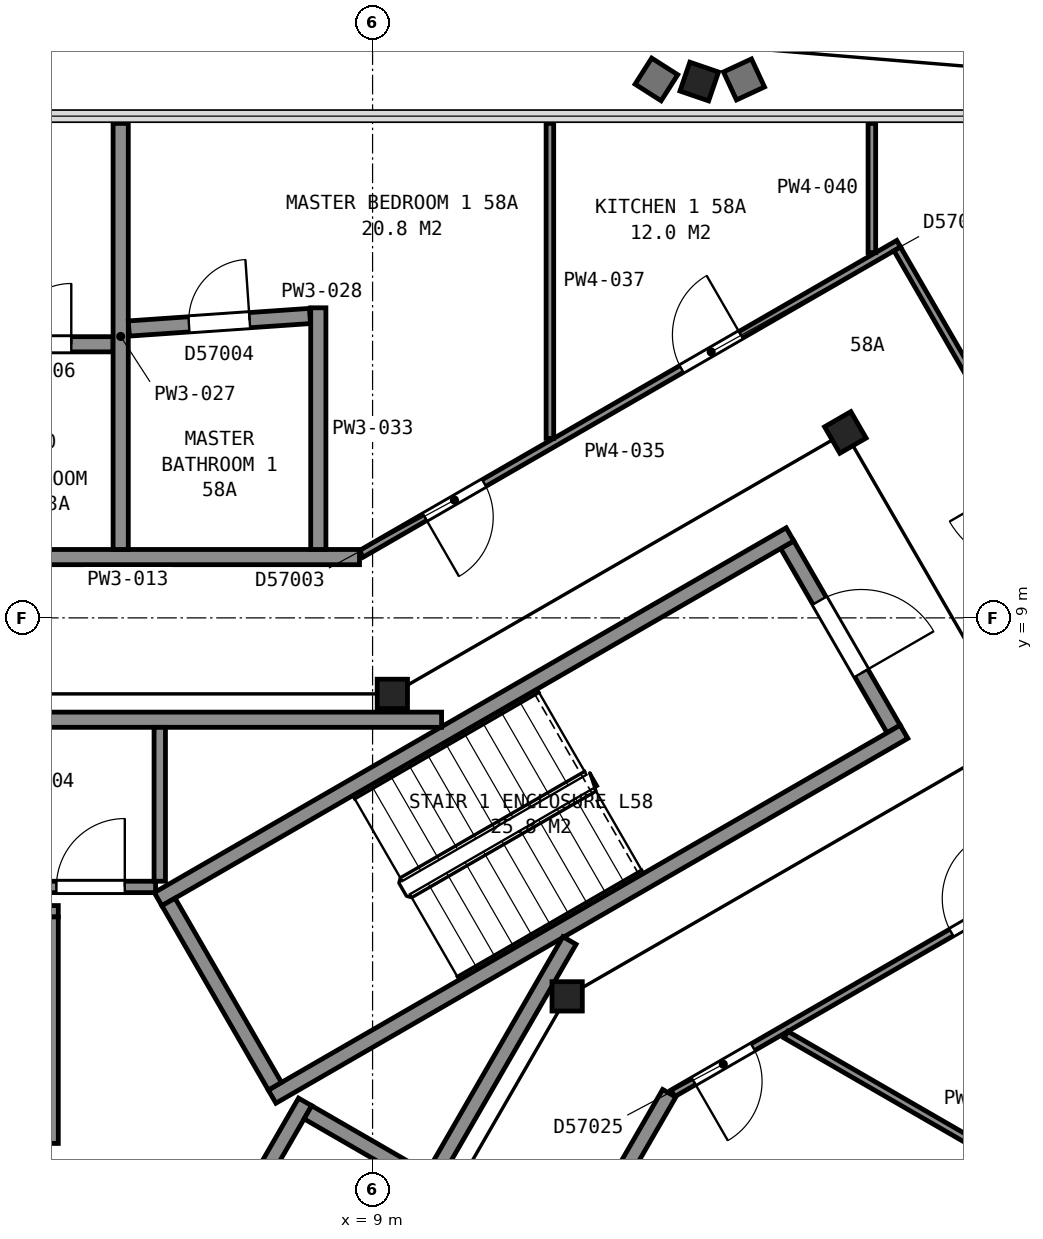
"""IFC4 building model, lengths in metres.
Left out: names, types, materials, properties, quantities, classifications, styles, units other than length and angle.
Written with IfcOpenShell. Run it as: python <this file> out.ifc"""

import sys

from ifc_helpers import new_model, si_unit, direction, frame, frame_2d, origin, origin_2d, place, context, subcontext, project, spatial, rectangle, i_section, extrude, element, fill, save


model = new_model("IFC4")
c1 = context("Model", 3, precision=1e-05, world=origin(), true_north=direction((0.0, 1.0)))
c2 = subcontext(c1, "Body", "Model", "MODEL_VIEW")
j1 = project(units=[si_unit("LENGTHUNIT", "METRE"), si_unit("PLANEANGLEUNIT", "RADIAN")], contexts=[c1])
p1 = place(None, origin())
s1 = spatial("IfcSite", under=j1, at=p1, CompositionType="ELEMENT")
p2 = place(p1, origin())
s2 = spatial("IfcBuilding", under=s1, at=p2, CompositionType="ELEMENT")
p3 = place(p2, frame((0.0, 0.0, 232.3)))
s3 = spatial("IfcBuildingStorey", under=s2, at=p3, CompositionType="ELEMENT", Elevation=232.3)
p4 = place(p3, frame((13.222, 15.837, 0.035), z_axis=(0.063574032022, 0.185512190953, 0.980583280227), x_axis=(0.997903164176, 0.000145439702, -0.064724444963)))
e1 = element("IfcColumn", 1, at=p4, inside=s3, PredefinedType="COLUMN", context=c2, shape_type="SweptSolid", body=[
    extrude(i_section(OverallWidth=0.401, OverallDepth=0.399, WebThickness=0.025, FlangeThickness=0.04, FilletRadius=0.015, at=origin_2d()), origin(), (0.0, 0.0, 1.0), 3.702),
])
p5 = place(p3, frame((11.56, 4.02, 0.0), z_axis=(0.0, 0.0, 1.0), x_axis=(1.0, 0.0, 0.0)))
e2 = element("IfcColumn", 2, at=p5, inside=s3, PredefinedType="COLUMN", context=c2, shape_type="SweptSolid", body=[
    extrude(i_section(OverallWidth=0.399, OverallDepth=0.386, WebThickness=0.021, FlangeThickness=0.033, FilletRadius=0.015, at=origin_2d()), origin(), (0.0, 0.0, 1.0), 3.7),
])
p6 = place(p3, frame((15.22, 11.44, 0.0), z_axis=(0.0, 0.0, 1.0), x_axis=(0.5, -0.866025403784, 0.0)))
e3 = element("IfcColumn", 3, at=p6, inside=s3, PredefinedType="COLUMN", context=c2, shape_type="SweptSolid", body=[
    extrude(i_section(OverallWidth=0.401, OverallDepth=0.399, WebThickness=0.025, FlangeThickness=0.04, FilletRadius=0.015, at=origin_2d()), origin(), (0.0, 0.0, 1.0), 3.7),
])
p7 = place(p3, frame((9.26, 8.0, 0.0), z_axis=(0.0, 0.0, 1.0), x_axis=(1.0, 0.0, 0.0)))
e4 = element("IfcColumn", 4, at=p7, inside=s3, PredefinedType="COLUMN", context=c2, shape_type="SweptSolid", body=[
    extrude(i_section(OverallWidth=0.399, OverallDepth=0.386, WebThickness=0.021, FlangeThickness=0.033, FilletRadius=0.015, at=origin_2d()), origin(), (0.0, 0.0, 1.0), 3.7),
])
p8 = place(p3, frame((15.855, 7.538, 0.0), z_axis=(0.0, 0.0, 1.0), x_axis=(-0.500049511043, 0.865996816683, 0.0)))
e5 = element("IfcWall", 5, at=p8, inside=s3, PredefinedType="PARTITIONING", context=c2, shape_type="SweptSolid", body=[
    extrude(rectangle(XDim=2.8, YDim=0.2, at=frame_2d((1.4, 0.0))), origin(), (0.0, 0.0, 1.0), 3.45),
])
p9 = place(p8, frame((0.85, 0.0, 0.0)))
e6 = element("IfcOpeningElement", 6, at=p9, cuts=e5, PredefinedType="OPENING", context=c2, shape_type="SweptSolid", body=[
    extrude(rectangle(XDim=1.1, YDim=2.1, at=frame_2d((0.55, 1.05))), frame((0.0, 0.11, 0.0), z_axis=(0.0, -1.0, 0.0), x_axis=(1.0, 0.0, 0.0)), (0.0, 0.0, 1.0), 0.22),
])
for number, where, z_axis, x_axis in (
    (7, (6.178, 5.299, 0.0), (0.0, 0.0, 1.0), (0.866, 0.5, 0.0)),
    (8, (7.678, 2.701, 0.0), (0.0, 0.0, 1.0), (0.866, 0.5, 0.0)),
):
    element("IfcWall", number, at=place(p3, frame(where, z_axis=z_axis, x_axis=x_axis)), inside=s3, PredefinedType="PARTITIONING", context=c2, shape_type="SweptSolid", body=[
        extrude(rectangle(XDim=9.6, YDim=0.2, at=frame_2d((4.8, 0.0))), origin(), (0.0, 0.0, 1.0), 3.45),
    ])
p10 = place(p3, frame((7.715, 2.838, 0.0), z_axis=(0.0, 0.0, 1.0), x_axis=(-0.500049511043, 0.865996816683, 0.0)))
e9 = element("IfcWall", 9, at=p10, inside=s3, PredefinedType="PARTITIONING", context=c2, shape_type="SweptSolid", body=[
    extrude(rectangle(XDim=2.8, YDim=0.2, at=frame_2d((1.4, 0.0))), origin(), (0.0, 0.0, 1.0), 3.45),
])
p11 = place(p3, frame((5.663, -1.612, 0.0), z_axis=(0.0, 0.0, 1.0), x_axis=(0.49998122708, 0.866036242063, 0.0)))
e10 = element("IfcWall", 10, at=p11, inside=s3, PredefinedType="PARTITIONING", context=c2, shape_type="SweptSolid", body=[
    extrude(rectangle(XDim=4.9, YDim=0.2, at=frame_2d((2.45, 0.0))), origin(), (0.0, 0.0, 1.0), 3.7),
])
p12 = place(p3, frame((9.665, 1.62, 0.0), z_axis=(0.0, 0.0, 1.0), x_axis=(-0.866002029911, 0.500040482552, 0.0)))
e11 = element("IfcWall", 11, at=p12, inside=s3, PredefinedType="PARTITIONING", context=c2, shape_type="SweptSolid", body=[
    extrude(rectangle(XDim=1.75, YDim=0.2, at=frame_2d((0.875, 0.0))), origin(), (0.0, 0.0, 1.0), 3.7),
])
p13 = place(p3, frame((-3.933, 7.66, 0.0), z_axis=(0.0, 0.0, 1.0), x_axis=(1.0, 0.0, 0.0)))
e12 = element("IfcWall", 12, at=p13, inside=s3, PredefinedType="PARTITIONING", context=c2, shape_type="SweptSolid", body=[
    extrude(rectangle(XDim=13.841, YDim=0.2, at=frame_2d((6.92, 0.0))), origin(), (0.0, 0.0, 1.0), 3.45),
])
p14 = place(p3, frame((-0.245, 5.14, 0.0), z_axis=(0.0, 0.0, 1.0), x_axis=(1.0, 0.0, 0.0)))
e13 = element("IfcWall", 13, at=p14, inside=s3, PredefinedType="PARTITIONING", context=c2, shape_type="SweptSolid", body=[
    extrude(rectangle(XDim=5.11, YDim=0.15, at=frame_2d((2.555, 0.0))), origin(), (0.0, 0.0, 1.0), 3.45),
])
p15 = place(p14, frame((0.175, 0.0, 0.0)))
e14 = element("IfcOpeningElement", 14, at=p15, cuts=e13, PredefinedType="OPENING", context=c2, shape_type="SweptSolid", body=[
    extrude(rectangle(XDim=1.0, YDim=2.1, at=frame_2d((0.5, 1.05))), frame((0.0, 0.085, 0.0), z_axis=(0.0, -1.0, 0.0), x_axis=(1.0, 0.0, 0.0)), (0.0, 0.0, 1.0), 0.17),
])
p16 = place(p3, frame((0.925, 5.46, 0.0), z_axis=(0.0, 0.0, 1.0), x_axis=(1.0, 0.0, 0.0)))
e15 = element("IfcWall", 15, at=p16, inside=s3, PredefinedType="PARTITIONING", context=c2, shape_type="SweptSolid", body=[
    extrude(rectangle(XDim=5.22, YDim=0.15, at=frame_2d((2.61, 0.0))), origin(), (0.0, 0.0, 1.0), 3.45),
])
p17 = place(p16, frame((3.915, 0.0, 0.0)))
e16 = element("IfcOpeningElement", 16, at=p17, cuts=e15, PredefinedType="OPENING", context=c2, shape_type="SweptSolid", body=[
    extrude(rectangle(XDim=0.9, YDim=2.1, at=frame_2d((0.45, 1.05))), frame((0.0, 0.085, 0.0), z_axis=(0.0, -1.0, 0.0), x_axis=(1.0, 0.0, 0.0)), (0.0, 0.0, 1.0), 0.17),
])
p18 = place(p3, frame((4.79, 2.085, 0.0), z_axis=(0.0, 0.0, 1.0), x_axis=(0.0, 1.0, 0.0)))
e17 = element("IfcWall", 17, at=p18, inside=s3, PredefinedType="PARTITIONING", context=c2, shape_type="SweptSolid", body=[
    extrude(rectangle(XDim=2.98, YDim=0.15, at=frame_2d((1.49, 0.0))), origin(), (0.0, 0.0, 1.0), 3.45),
])
p19 = place(p3, frame((6.2, 5.535, 0.0), z_axis=(0.0, 0.0, 1.0), x_axis=(0.0, 1.0, 0.0)))
e18 = element("IfcWall", 18, at=p19, inside=s3, PredefinedType="PARTITIONING", context=c2, shape_type="SweptSolid", body=[
    extrude(rectangle(XDim=2.025, YDim=0.15, at=frame_2d((1.013, 0.0))), origin(), (0.0, 0.0, 1.0), 3.45),
])
p20 = place(p3, frame((9.803, 1.658, 0.0), z_axis=(0.0, 0.0, 1.0), x_axis=(0.499943114462, 0.866058244174, 0.0)))
e19 = element("IfcWall", 19, at=p20, inside=s3, PredefinedType="PARTITIONING", context=c2, shape_type="SweptSolid", body=[
    extrude(rectangle(XDim=3.576, YDim=0.2, at=frame_2d((1.788, 0.0))), origin(), (0.0, 0.0, 1.0), 3.45),
])
p21 = place(p3, frame((-8.828, 9.8, 0.0), z_axis=(0.0, 0.0, 1.0), x_axis=(1.0, 0.0, 0.0)))
e20 = element("IfcWall", 20, at=p21, inside=s3, PredefinedType="PARTITIONING", context=c2, shape_type="SweptSolid", body=[
    extrude(rectangle(XDim=17.656, YDim=0.2, at=frame_2d((8.828, 0.0))), origin(), (0.0, 0.0, 1.0), 2.713),
])
p22 = place(p21, frame((10.658, 0.0, 0.0)))
e21 = element("IfcOpeningElement", 21, at=p22, cuts=e20, PredefinedType="OPENING", context=c2, shape_type="SweptSolid", body=[
    extrude(rectangle(XDim=0.9, YDim=2.1, at=frame_2d((0.45, 1.05))), frame((0.0, 0.11, 0.0), z_axis=(0.0, -1.0, 0.0), x_axis=(1.0, 0.0, 0.0)), (0.0, 0.0, 1.0), 0.22),
])
p23 = place(p21, frame((6.825, 0.0, 0.0)))
e22 = element("IfcOpeningElement", 22, at=p23, cuts=e20, PredefinedType="OPENING", context=c2, shape_type="SweptSolid", body=[
    extrude(rectangle(XDim=0.9, YDim=2.1, at=frame_2d((0.45, 1.05))), frame((0.0, 0.11, 0.0), z_axis=(0.0, -1.0, 0.0), x_axis=(1.0, 0.0, 0.0)), (0.0, 0.0, 1.0), 0.22),
])
p24 = place(p21, frame((1.95, 0.0, 0.0)))
e23 = element("IfcOpeningElement", 23, at=p24, cuts=e20, PredefinedType="OPENING", context=c2, shape_type="SweptSolid", body=[
    extrude(rectangle(XDim=0.9, YDim=2.1, at=frame_2d((0.45, 1.05))), frame((0.0, 0.11, 0.0), z_axis=(0.0, -1.0, 0.0), x_axis=(1.0, 0.0, 0.0)), (0.0, 0.0, 1.0), 0.22),
])
p25 = place(p3, frame((5.586, 12.6, 0.0), z_axis=(0.0, 0.0, 1.0), x_axis=(-1.0, 0.0, 0.0)))
e24 = element("IfcWall", 24, at=p25, inside=s3, PredefinedType="PARTITIONING", context=c2, shape_type="SweptSolid", body=[
    extrude(rectangle(XDim=1.9, YDim=0.2, at=frame_2d((0.95, 0.0))), origin(), (0.0, 0.0, 1.0), 2.713),
])
p26 = place(p25, frame((0.55, 0.0, 0.0)))
e25 = element("IfcOpeningElement", 25, at=p26, cuts=e24, PredefinedType="OPENING", context=c2, shape_type="SweptSolid", body=[
    extrude(rectangle(XDim=0.8, YDim=2.1, at=frame_2d((0.4, 1.05))), frame((0.0, 0.11, 0.0), z_axis=(0.0, -1.0, 0.0), x_axis=(1.0, 0.0, 0.0)), (0.0, 0.0, 1.0), 0.22),
])
p27 = place(p3, frame((12.903, 2.745, 0.0), z_axis=(0.0, 0.0, 1.0), x_axis=(-0.499999743747, -0.866025551732, 0.0)))
e26 = element("IfcWall", 26, at=p27, inside=s3, PredefinedType="PARTITIONING", context=c2, shape_type="SweptSolid", body=[
    extrude(rectangle(XDim=17.656, YDim=0.2, at=frame_2d((8.828, 0.0))), origin(), (0.0, 0.0, 1.0), 2.713),
])
p28 = place(p27, frame((10.134, 0.0, 0.0)))
e27 = element("IfcOpeningElement", 27, at=p28, cuts=e26, PredefinedType="OPENING", context=c2, shape_type="SweptSolid", body=[
    extrude(rectangle(XDim=0.9, YDim=2.1, at=frame_2d((0.45, 1.05))), frame((0.0, 0.11, 0.0), z_axis=(0.0, -1.0, 0.0), x_axis=(1.0, 0.0, 0.0)), (0.0, 0.0, 1.0), 0.22),
])
p29 = place(p27, frame((6.073, 0.0, 0.0)))
e28 = element("IfcOpeningElement", 28, at=p29, cuts=e26, PredefinedType="OPENING", context=c2, shape_type="SweptSolid", body=[
    extrude(rectangle(XDim=0.9, YDim=2.1, at=frame_2d((0.45, 1.05))), frame((0.0, 0.11, 0.0), z_axis=(0.0, -1.0, 0.0), x_axis=(1.0, 0.0, 0.0)), (0.0, 0.0, 1.0), 0.22),
])
p30 = place(p3, frame((5.686, 9.9, 0.0), z_axis=(0.0, 0.0, 1.0), x_axis=(0.0, 1.0, 0.0)))
e29 = element("IfcWall", 29, at=p30, inside=s3, PredefinedType="PARTITIONING", context=c2, shape_type="SweptSolid", body=[
    extrude(rectangle(XDim=5.606, YDim=0.2, at=frame_2d((2.803, 0.0))), origin(), (0.0, 0.0, 1.0), 2.713),
])
p31 = place(p3, frame((8.176, 12.972, 0.0), z_axis=(0.0, 0.0, 1.0), x_axis=(-0.997610938758, -0.069082666933, 0.0)))
e30 = element("IfcWall", 30, at=p31, inside=s3, PredefinedType="PARTITIONING", context=c2, shape_type="SweptSolid", body=[
    extrude(rectangle(XDim=2.389, YDim=0.2, at=frame_2d((1.194, 0.0))), origin(), (0.0, 0.0, 1.0), 2.713),
])
p32 = place(p31, frame((0.796, 0.0, 0.0)))
e31 = element("IfcOpeningElement", 31, at=p32, cuts=e30, PredefinedType="OPENING", context=c2, shape_type="SweptSolid", body=[
    extrude(rectangle(XDim=0.8, YDim=2.1, at=frame_2d((0.4, 1.05))), frame((0.0, 0.11, 0.0), z_axis=(0.0, -1.0, 0.0), x_axis=(1.0, 0.0, 0.0)), (0.0, 0.0, 1.0), 0.22),
])
p33 = place(p3, frame((8.286, 9.9, 0.0), z_axis=(0.0, 0.0, 1.0), x_axis=(0.0, 1.0, 0.0)))
e32 = element("IfcWall", 32, at=p33, inside=s3, PredefinedType="PARTITIONING", context=c2, shape_type="SweptSolid", body=[
    extrude(rectangle(XDim=3.18, YDim=0.2, at=frame_2d((1.59, 0.0))), origin(), (0.0, 0.0, 1.0), 2.713),
])
p34 = place(p3, frame((8.852, 9.843, 0.0), z_axis=(0.0, 0.0, 1.0), x_axis=(0.866088973199, 0.499889878377, 0.0)))
e33 = element("IfcWall", 33, at=p34, inside=s3, PredefinedType="PARTITIONING", context=c2, shape_type="SweptSolid", body=[
    extrude(rectangle(XDim=8.163, YDim=0.1, at=frame_2d((4.082, 0.0))), origin(), (0.0, 0.0, 1.0), 2.713),
])
p35 = place(p34, frame((4.865, 0.0, 0.0)))
e34 = element("IfcOpeningElement", 34, at=p35, cuts=e33, PredefinedType="OPENING", context=c2, shape_type="SweptSolid", body=[
    extrude(rectangle(XDim=0.9, YDim=2.1, at=frame_2d((0.45, 1.05))), frame((0.0, 0.06, 0.0), z_axis=(0.0, -1.0, 0.0), x_axis=(1.0, 0.0, 0.0)), (0.0, 0.0, 1.0), 0.12),
])
p36 = place(p34, frame((0.965, 0.0, 0.0)))
e35 = element("IfcOpeningElement", 35, at=p36, cuts=e33, PredefinedType="OPENING", context=c2, shape_type="SweptSolid", body=[
    extrude(rectangle(XDim=0.9, YDim=2.1, at=frame_2d((0.45, 1.05))), frame((0.0, 0.06, 0.0), z_axis=(0.0, -1.0, 0.0), x_axis=(1.0, 0.0, 0.0)), (0.0, 0.0, 1.0), 0.12),
])
p37 = place(p3, frame((11.333, 11.362, 0.0), z_axis=(0.0, 0.0, 1.0), x_axis=(0.0, 1.0, 0.0)))
e36 = element("IfcWall", 36, at=p37, inside=s3, PredefinedType="PARTITIONING", context=c2, shape_type="SweptSolid", body=[
    extrude(rectangle(XDim=4.145, YDim=0.1, at=frame_2d((2.072, 0.0))), origin(), (0.0, 0.0, 1.0), 2.713),
])
p38 = place(p3, frame((20.023, 6.826, 0.0), z_axis=(0.0, 0.0, 1.0), x_axis=(-0.86608949446, -0.499888975259, 0.0)))
e37 = element("IfcWall", 37, at=p38, inside=s3, PredefinedType="PARTITIONING", context=c2, shape_type="SweptSolid", body=[
    extrude(rectangle(XDim=8.165, YDim=0.1, at=frame_2d((4.083, 0.0))), origin(), (0.0, 0.0, 1.0), 2.713),
])
p39 = place(p38, frame((6.95, 0.0, 0.0)))
e38 = element("IfcOpeningElement", 38, at=p39, cuts=e37, PredefinedType="OPENING", context=c2, shape_type="SweptSolid", body=[
    extrude(rectangle(XDim=0.9, YDim=2.1, at=frame_2d((0.45, 1.05))), frame((0.0, 0.06, 0.0), z_axis=(0.0, -1.0, 0.0), x_axis=(1.0, 0.0, 0.0)), (0.0, 0.0, 1.0), 0.12),
])
p40 = place(p38, frame((3.035, 0.0, 0.0)))
e39 = element("IfcOpeningElement", 39, at=p40, cuts=e37, PredefinedType="OPENING", context=c2, shape_type="SweptSolid", body=[
    extrude(rectangle(XDim=0.9, YDim=2.1, at=frame_2d((0.45, 1.05))), frame((0.0, 0.06, 0.0), z_axis=(0.0, -1.0, 0.0), x_axis=(1.0, 0.0, 0.0)), (0.0, 0.0, 1.0), 0.12),
])
p41 = place(p3, frame((14.438, 3.517, 0.0), z_axis=(0.0, 0.0, 1.0), x_axis=(0.866006230416, -0.500033207779, 0.0)))
e40 = element("IfcWall", 40, at=p41, inside=s3, PredefinedType="PARTITIONING", context=c2, shape_type="SweptSolid", body=[
    extrude(rectangle(XDim=4.76, YDim=0.1, at=frame_2d((2.38, 0.0))), origin(), (0.0, 0.0, 1.0), 2.713),
])
p42 = place(p3, frame((15.569, 13.807, 0.0), z_axis=(0.0, 0.0, 1.0), x_axis=(0.0, 1.0, 0.0)))
e41 = element("IfcWall", 41, at=p42, inside=s3, PredefinedType="PARTITIONING", context=c2, shape_type="SweptSolid", body=[
    extrude(rectangle(XDim=1.699, YDim=0.1, at=frame_2d((0.85, 0.0))), origin(), (0.0, 0.0, 1.0), 2.713),
])
p43 = place(p3, frame((15.903, 13.855, 0.0), z_axis=(0.0, 0.0, 1.0), x_axis=(0.500415732313, -0.865785247537, 0.0)))
e42 = element("IfcWall", 42, at=p43, inside=s3, PredefinedType="PARTITIONING", context=c2, shape_type="SweptSolid", body=[
    extrude(rectangle(XDim=8.097, YDim=0.1, at=frame_2d((4.049, 0.0))), origin(), (0.0, 0.0, 1.0), 2.713),
])
p44 = place(p43, frame((3.45, 0.0, 0.0)))
e43 = element("IfcOpeningElement", 43, at=p44, cuts=e42, PredefinedType="OPENING", context=c2, shape_type="SweptSolid", body=[
    extrude(rectangle(XDim=1.2, YDim=2.1, at=frame_2d((0.6, 1.05))), frame((0.0, 0.06, 0.0), z_axis=(0.0, -1.0, 0.0), x_axis=(1.0, 0.0, 0.0)), (0.0, 0.0, 1.0), 0.12),
])
p45 = place(p9, origin())
e44 = element("IfcDoor", 44, at=p45, inside=s3, OperationType="SINGLE_SWING_LEFT", PredefinedType="DOOR", context=c2, shape_type="SweptSolid", body=[
    extrude(rectangle(XDim=1.1, YDim=2.1, at=frame_2d((0.55, 1.05))), frame((0.0, 0.025, 0.0), z_axis=(0.0, -1.0, 0.0), x_axis=(1.0, 0.0, 0.0)), (0.0, 0.0, 1.0), 0.05),
])
fill(e6, e44)
p46 = place(p17, origin())
e45 = element("IfcDoor", 45, at=p46, inside=s3, OperationType="SINGLE_SWING_RIGHT", PredefinedType="DOOR", context=c2, shape_type="SweptSolid", body=[
    extrude(rectangle(XDim=0.9, YDim=2.1, at=frame_2d((0.45, 1.05))), frame((0.0, 0.025, 0.0), z_axis=(0.0, -1.0, 0.0), x_axis=(1.0, 0.0, 0.0)), (0.0, 0.0, 1.0), 0.05),
])
fill(e16, e45)
p47 = place(p26, origin())
e46 = element("IfcDoor", 46, at=p47, inside=s3, OperationType="SINGLE_SWING_LEFT", PredefinedType="DOOR", context=c2, shape_type="SweptSolid", body=[
    extrude(rectangle(XDim=0.8, YDim=2.1, at=frame_2d((0.4, 1.05))), frame((0.0, 0.025, 0.0), z_axis=(0.0, -1.0, 0.0), x_axis=(1.0, 0.0, 0.0)), (0.0, 0.0, 1.0), 0.05),
])
fill(e25, e46)
p48 = place(p32, origin())
e47 = element("IfcDoor", 47, at=p48, inside=s3, OperationType="SINGLE_SWING_LEFT", PredefinedType="DOOR", context=c2, shape_type="SweptSolid", body=[
    extrude(rectangle(XDim=0.8, YDim=2.1, at=frame_2d((0.4, 1.05))), frame((0.0, 0.025, 0.0), z_axis=(0.0, -1.0, 0.0), x_axis=(1.0, 0.0, 0.0)), (0.0, 0.0, 1.0), 0.05),
])
fill(e31, e47)
p49 = place(p35, origin())
e48 = element("IfcDoor", 48, at=p49, inside=s3, OperationType="SINGLE_SWING_RIGHT", PredefinedType="DOOR", context=c2, shape_type="SweptSolid", body=[
    extrude(rectangle(XDim=0.9, YDim=2.1, at=frame_2d((0.45, 1.05))), frame((0.0, 0.025, 0.0), z_axis=(0.0, -1.0, 0.0), x_axis=(1.0, 0.0, 0.0)), (0.0, 0.0, 1.0), 0.05),
])
fill(e34, e48)
p50 = place(p36, origin())
e49 = element("IfcDoor", 49, at=p50, inside=s3, OperationType="SINGLE_SWING_LEFT", PredefinedType="DOOR", context=c2, shape_type="SweptSolid", body=[
    extrude(rectangle(XDim=0.9, YDim=2.1, at=frame_2d((0.45, 1.05))), frame((0.0, 0.025, 0.0), z_axis=(0.0, -1.0, 0.0), x_axis=(1.0, 0.0, 0.0)), (0.0, 0.0, 1.0), 0.05),
])
fill(e35, e49)
p51 = place(p39, origin())
e50 = element("IfcDoor", 50, at=p51, inside=s3, OperationType="SINGLE_SWING_RIGHT", PredefinedType="DOOR", context=c2, shape_type="SweptSolid", body=[
    extrude(rectangle(XDim=0.9, YDim=2.1, at=frame_2d((0.45, 1.05))), frame((0.0, 0.025, 0.0), z_axis=(0.0, -1.0, 0.0), x_axis=(1.0, 0.0, 0.0)), (0.0, 0.0, 1.0), 0.05),
])
fill(e38, e50)
p52 = place(p40, origin())
e51 = element("IfcDoor", 51, at=p52, inside=s3, OperationType="SINGLE_SWING_LEFT", PredefinedType="DOOR", context=c2, shape_type="SweptSolid", body=[
    extrude(rectangle(XDim=0.9, YDim=2.1, at=frame_2d((0.45, 1.05))), frame((0.0, 0.025, 0.0), z_axis=(0.0, -1.0, 0.0), x_axis=(1.0, 0.0, 0.0)), (0.0, 0.0, 1.0), 0.05),
])
fill(e39, e51)
save(model, sys.argv[1])
